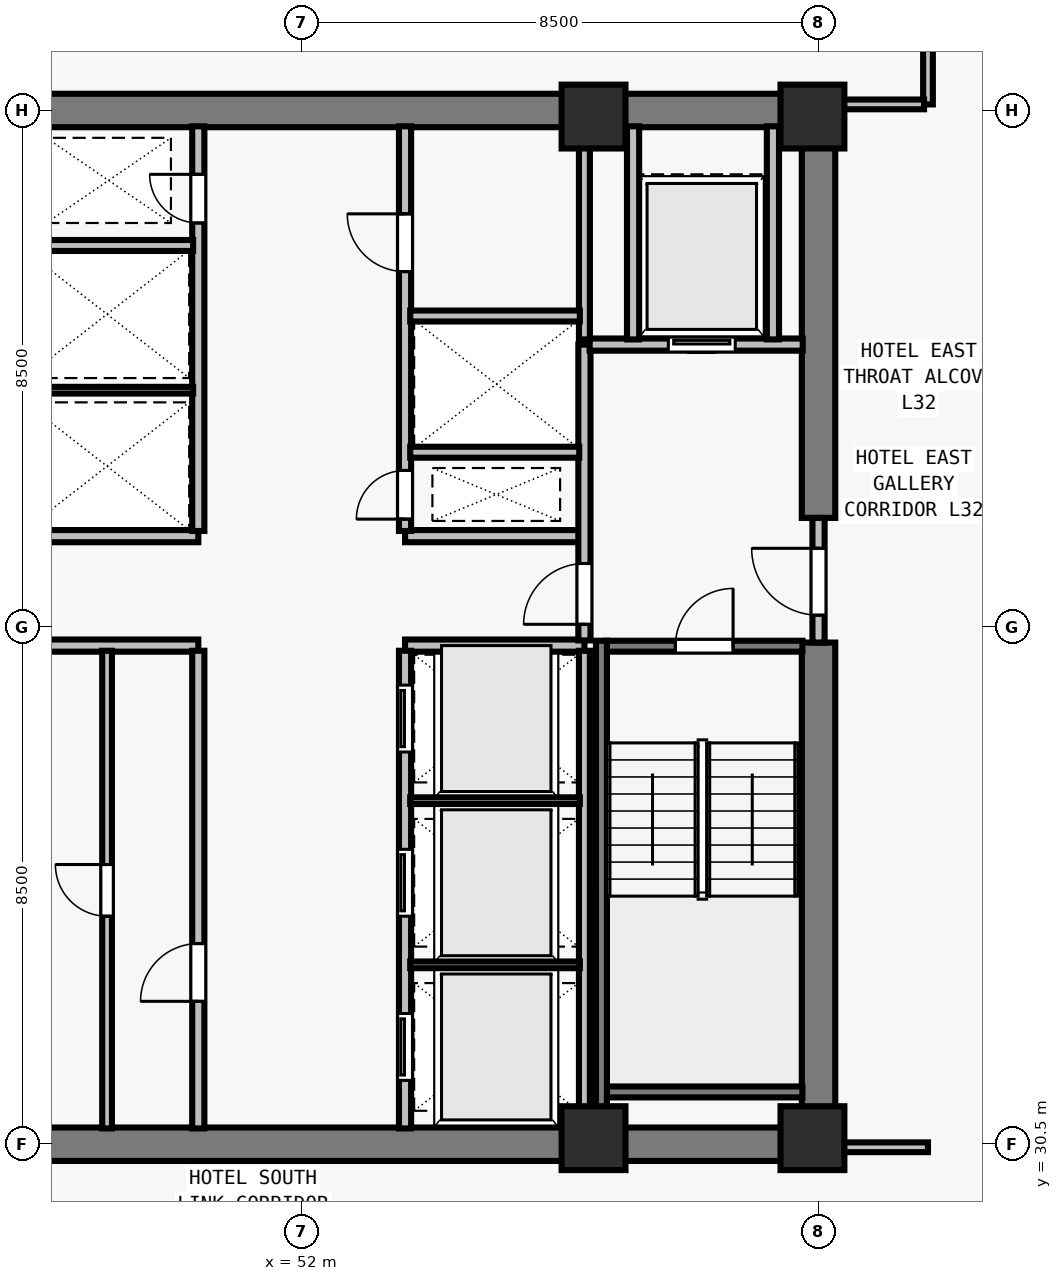
"""IFC4 building model, lengths in metres.
Left out: names, types, materials, properties, quantities, classifications, styles, units other than length and angle.
Written with IfcOpenShell. Run it as: python <this file> out.ifc"""

import sys

from ifc_helpers import new_model, si_unit, direction, frame, frame_2d, origin, origin_2d, place, context, subcontext, project, spatial, rectangle, extrude, element, fill, save


model = new_model("IFC4")
c1 = context("Model", 3, precision=1e-05, world=origin(), true_north=direction((0.0, 1.0)))
c2 = subcontext(c1, "Body", "Model", "MODEL_VIEW")
j1 = project(units=[si_unit("LENGTHUNIT", "METRE"), si_unit("PLANEANGLEUNIT", "RADIAN")], contexts=[c1])
p1 = place(None, origin())
s1 = spatial("IfcSite", under=j1, at=p1, CompositionType="ELEMENT")
p2 = place(p1, origin())
s2 = spatial("IfcBuilding", under=s1, at=p2, CompositionType="ELEMENT")
p3 = place(p2, frame((0.0, 0.0, 120.0)))
s3 = spatial("IfcBuildingStorey", under=s2, at=p3, CompositionType="ELEMENT", Elevation=120.0)
for number, where, z_axis, x_axis in (
    (1, (56.8, 30.6, 0.0), (0.0, 0.0, 1.0), (1.0, 0.0, 0.0)),
    (2, (60.4, 30.6, 0.0), (0.0, 0.0, 1.0), (1.0, 0.0, 0.0)),
    (3, (56.8, 47.4, 0.0), (0.0, 0.0, 1.0), (1.0, 0.0, 0.0)),
    (4, (60.4, 47.4, 0.0), (0.0, 0.0, 1.0), (1.0, 0.0, 0.0)),
):
    element("IfcColumn", number, at=place(p3, frame(where, z_axis=z_axis, x_axis=x_axis)), inside=s3, PredefinedType="COLUMN", context=c2, shape_type="SweptSolid", body=[
        extrude(rectangle(XDim=1.05, YDim=1.05, at=origin_2d()), origin(), (0.0, 0.0, 1.0), 3.5),
    ])
for number, where, z_axis, x_axis in (
    (5, (43.225, 30.5, 0.0), (0.0, 0.0, 1.0), (1.0, 0.0, 0.0)),
    (6, (43.225, 47.5, 0.0), (0.0, 0.0, 1.0), (1.0, 0.0, 0.0)),
):
    element("IfcWall", number, at=place(p3, frame(where, z_axis=z_axis, x_axis=x_axis)), inside=s3, PredefinedType="SHEAR", context=c2, shape_type="SweptSolid", body=[
        extrude(rectangle(XDim=17.55, YDim=0.55, at=frame_2d((8.775, 0.0))), origin(), (0.0, 0.0, 1.0), 3.28),
    ])
p4 = place(p3, frame((60.5, 30.765, 0.0), z_axis=(0.0, 0.0, 1.0), x_axis=(0.0, 1.0, 0.0)))
e7 = element("IfcWall", 7, at=p4, inside=s3, PredefinedType="SHEAR", context=c2, shape_type="SweptSolid", body=[
    extrude(rectangle(XDim=7.985, YDim=0.55, at=frame_2d((3.993, 0.0))), origin(), (0.0, 0.0, 1.0), 3.28),
])
p5 = place(p3, frame((60.5, 40.8, 0.0), z_axis=(0.0, 0.0, 1.0), x_axis=(0.0, 1.0, 0.0)))
e8 = element("IfcWall", 8, at=p5, inside=s3, PredefinedType="SHEAR", context=c2, shape_type="SweptSolid", body=[
    extrude(rectangle(XDim=6.435, YDim=0.55, at=frame_2d((3.218, 0.0))), origin(), (0.0, 0.0, 1.0), 3.28),
])
for number, where, z_axis, x_axis in (
    (9, (47.35, 38.7, 0.0), (0.0, 0.0, 1.0), (1.0, 0.0, 0.0)),
    (10, (47.35, 40.5, 0.0), (0.0, 0.0, 1.0), (1.0, 0.0, 0.0)),
    (11, (53.7, 38.7, 0.0), (0.0, 0.0, 1.0), (1.0, 0.0, 0.0)),
    (12, (53.7, 40.5, 0.0), (0.0, 0.0, 1.0), (1.0, 0.0, 0.0)),
):
    element("IfcWall", number, at=place(p3, frame(where, z_axis=z_axis, x_axis=x_axis)), inside=s3, PredefinedType="SOLIDWALL", context=c2, shape_type="SweptSolid", body=[
        extrude(rectangle(XDim=2.95, YDim=0.2, at=frame_2d((1.475, 0.0))), origin(), (0.0, 0.0, 1.0), 3.28),
    ])
p6 = place(p3, frame((50.3, 30.76, 0.0), z_axis=(0.0, 0.0, 1.0), x_axis=(0.0, 1.0, 0.0)))
e13 = element("IfcWall", 13, at=p6, inside=s3, PredefinedType="SOLIDWALL", context=c2, shape_type="SweptSolid", body=[
    extrude(rectangle(XDim=7.855, YDim=0.2, at=frame_2d((3.927, 0.0))), origin(), (0.0, 0.0, 1.0), 3.28),
])
p7 = place(p6, frame((2.09, 0.0, 0.0)))
e14 = element("IfcOpeningElement", 14, at=p7, cuts=e13, PredefinedType="OPENING", context=c2, shape_type="SweptSolid", body=[
    extrude(rectangle(XDim=0.95, YDim=2.12, at=frame_2d((0.475, 1.06))), frame((0.0, 0.11, 0.0), z_axis=(0.0, -1.0, 0.0), x_axis=(1.0, 0.0, 0.0)), (0.0, 0.0, 1.0), 0.22),
])
p8 = place(p3, frame((53.7, 30.76, 0.0), z_axis=(0.0, 0.0, 1.0), x_axis=(0.0, 1.0, 0.0)))
e15 = element("IfcWall", 15, at=p8, inside=s3, PredefinedType="SOLIDWALL", context=c2, shape_type="SweptSolid", body=[
    extrude(rectangle(XDim=7.855, YDim=0.2, at=frame_2d((3.927, 0.0))), origin(), (0.0, 0.0, 1.0), 3.28),
])
p9 = place(p8, frame((0.79, 0.0, 0.0)))
e16 = element("IfcOpeningElement", 16, at=p9, cuts=e15, PredefinedType="OPENING", context=c2, shape_type="SweptSolid", body=[
    extrude(rectangle(XDim=1.1, YDim=2.2, at=frame_2d((0.55, 1.1))), frame((0.0, 0.11, 0.0), z_axis=(0.0, -1.0, 0.0), x_axis=(1.0, 0.0, 0.0)), (0.0, 0.0, 1.0), 0.22),
])
p10 = place(p8, frame((3.49, 0.0, 0.0)))
e17 = element("IfcOpeningElement", 17, at=p10, cuts=e15, PredefinedType="OPENING", context=c2, shape_type="SweptSolid", body=[
    extrude(rectangle(XDim=1.1, YDim=2.2, at=frame_2d((0.55, 1.1))), frame((0.0, 0.11, 0.0), z_axis=(0.0, -1.0, 0.0), x_axis=(1.0, 0.0, 0.0)), (0.0, 0.0, 1.0), 0.22),
])
p11 = place(p8, frame((6.19, 0.0, 0.0)))
e18 = element("IfcOpeningElement", 18, at=p11, cuts=e15, PredefinedType="OPENING", context=c2, shape_type="SweptSolid", body=[
    extrude(rectangle(XDim=1.1, YDim=2.2, at=frame_2d((0.55, 1.1))), frame((0.0, 0.11, 0.0), z_axis=(0.0, -1.0, 0.0), x_axis=(1.0, 0.0, 0.0)), (0.0, 0.0, 1.0), 0.22),
])
p12 = place(p3, frame((50.3, 40.585, 0.0), z_axis=(0.0, 0.0, 1.0), x_axis=(0.0, 1.0, 0.0)))
e19 = element("IfcWall", 19, at=p12, inside=s3, PredefinedType="SOLIDWALL", context=c2, shape_type="SweptSolid", body=[
    extrude(rectangle(XDim=6.655, YDim=0.2, at=frame_2d((3.328, 0.0))), origin(), (0.0, 0.0, 1.0), 3.28),
])
p13 = place(p12, frame((5.065, 0.0, 0.0)))
e20 = element("IfcOpeningElement", 20, at=p13, cuts=e19, PredefinedType="OPENING", context=c2, shape_type="SweptSolid", body=[
    extrude(rectangle(XDim=0.8, YDim=2.08, at=frame_2d((0.4, 1.04))), frame((0.0, 0.11, 0.0), z_axis=(0.0, -1.0, 0.0), x_axis=(1.0, 0.0, 0.0)), (0.0, 0.0, 1.0), 0.22),
])
p14 = place(p3, frame((53.7, 40.585, 0.0), z_axis=(0.0, 0.0, 1.0), x_axis=(0.0, 1.0, 0.0)))
e21 = element("IfcWall", 21, at=p14, inside=s3, PredefinedType="SOLIDWALL", context=c2, shape_type="SweptSolid", body=[
    extrude(rectangle(XDim=6.655, YDim=0.2, at=frame_2d((3.328, 0.0))), origin(), (0.0, 0.0, 1.0), 3.28),
])
p15 = place(p14, frame((0.195, 0.0, 0.0)))
e22 = element("IfcOpeningElement", 22, at=p15, cuts=e21, PredefinedType="OPENING", context=c2, shape_type="SweptSolid", body=[
    extrude(rectangle(XDim=0.8, YDim=2.08, at=frame_2d((0.4, 1.04))), frame((0.0, 0.11, 0.0), z_axis=(0.0, -1.0, 0.0), x_axis=(1.0, 0.0, 0.0)), (0.0, 0.0, 1.0), 0.22),
])
p16 = place(p14, frame((4.265, 0.0, 0.0)))
e23 = element("IfcOpeningElement", 23, at=p16, cuts=e21, PredefinedType="OPENING", context=c2, shape_type="SweptSolid", body=[
    extrude(rectangle(XDim=0.95, YDim=2.12, at=frame_2d((0.475, 1.06))), frame((0.0, 0.11, 0.0), z_axis=(0.0, -1.0, 0.0), x_axis=(1.0, 0.0, 0.0)), (0.0, 0.0, 1.0), 0.22),
])
p17 = place(p3, frame((60.5, 38.75, 0.0), z_axis=(0.0, 0.0, 1.0), x_axis=(0.0, 1.0, 0.0)))
e24 = element("IfcWall", 24, at=p17, inside=s3, PredefinedType="SOLIDWALL", context=c2, shape_type="SweptSolid", body=[
    extrude(rectangle(XDim=2.05, YDim=0.2, at=frame_2d((1.025, 0.0))), origin(), (0.0, 0.0, 1.0), 3.28),
])
p18 = place(p17, frame((0.45, 0.0, 0.0)))
e25 = element("IfcOpeningElement", 25, at=p18, cuts=e24, PredefinedType="OPENING", context=c2, shape_type="SweptSolid", body=[
    extrude(rectangle(XDim=1.1, YDim=2.15, at=frame_2d((0.55, 1.075))), frame((0.0, 0.11, 0.0), z_axis=(0.0, -1.0, 0.0), x_axis=(1.0, 0.0, 0.0)), (0.0, 0.0, 1.0), 0.22),
])
p19 = place(p3, frame((56.65, 38.785, 0.0), z_axis=(0.0, 0.0, 1.0), x_axis=(0.0, 1.0, 0.0)))
e26 = element("IfcWall", 26, at=p19, inside=s3, PredefinedType="SOLIDWALL", context=c2, shape_type="SweptSolid", body=[
    extrude(rectangle(XDim=4.865, YDim=0.2, at=frame_2d((2.433, 0.0))), origin(), (0.0, 0.0, 1.0), 3.28),
])
p20 = place(p19, frame((0.265, 0.0, 0.0)))
e27 = element("IfcOpeningElement", 27, at=p20, cuts=e26, PredefinedType="OPENING", context=c2, shape_type="SweptSolid", body=[
    extrude(rectangle(XDim=1.0, YDim=2.15, at=frame_2d((0.5, 1.075))), frame((0.0, 0.11, 0.0), z_axis=(0.0, -1.0, 0.0), x_axis=(1.0, 0.0, 0.0)), (0.0, 0.0, 1.0), 0.22),
])
p21 = place(p3, frame((56.735, 43.65, 0.0), z_axis=(0.0, 0.0, 1.0), x_axis=(1.0, 0.0, 0.0)))
e28 = element("IfcWall", 28, at=p21, inside=s3, PredefinedType="SOLIDWALL", context=c2, shape_type="SweptSolid", body=[
    extrude(rectangle(XDim=3.505, YDim=0.2, at=frame_2d((1.752, 0.0))), origin(), (0.0, 0.0, 1.0), 3.28),
])
p22 = place(p21, frame((1.295, 0.0, 0.0)))
e29 = element("IfcOpeningElement", 29, at=p22, cuts=e28, PredefinedType="OPENING", context=c2, shape_type="SweptSolid", body=[
    extrude(rectangle(XDim=1.1, YDim=2.2, at=frame_2d((0.55, 1.1))), frame((0.0, 0.11, 0.0), z_axis=(0.0, -1.0, 0.0), x_axis=(1.0, 0.0, 0.0)), (0.0, 0.0, 1.0), 0.22),
])
for number, where, z_axis, x_axis in (
    (30, (57.45, 43.735, 0.0), (0.0, 0.0, 1.0), (0.0, 1.0, 0.0)),
    (31, (59.75, 43.735, 0.0), (0.0, 0.0, 1.0), (0.0, 1.0, 0.0)),
):
    element("IfcWall", number, at=place(p3, frame(where, z_axis=z_axis, x_axis=x_axis)), inside=s3, PredefinedType="SOLIDWALL", context=c2, shape_type="SweptSolid", body=[
        extrude(rectangle(XDim=3.505, YDim=0.2, at=frame_2d((1.752, 0.0))), origin(), (0.0, 0.0, 1.0), 3.28),
    ])
p23 = place(p3, frame((48.8, 30.76, 0.0), z_axis=(0.0, 0.0, 1.0), x_axis=(0.0, 1.0, 0.0)))
e32 = element("IfcWall", 32, at=p23, inside=s3, PredefinedType="PARTITIONING", context=c2, shape_type="SweptSolid", body=[
    extrude(rectangle(XDim=7.855, YDim=0.16, at=frame_2d((3.927, 0.0))), origin(), (0.0, 0.0, 1.0), 3.28),
])
p24 = place(p23, frame((3.49, 0.0, 0.0)))
e33 = element("IfcOpeningElement", 33, at=p24, cuts=e32, PredefinedType="OPENING", context=c2, shape_type="SweptSolid", body=[
    extrude(rectangle(XDim=0.85, YDim=2.12, at=frame_2d((0.425, 1.06))), frame((0.0, 0.09, 0.0), z_axis=(0.0, -1.0, 0.0), x_axis=(1.0, 0.0, 0.0)), (0.0, 0.0, 1.0), 0.18),
])
p25 = place(p3, frame((56.65, 30.76, 0.0), z_axis=(0.0, 0.0, 1.0), x_axis=(0.0, 1.0, 0.0)))
e34 = element("IfcWall", 34, at=p25, inside=s3, PredefinedType="SOLIDWALL", context=c2, shape_type="SweptSolid", body=[
    extrude(rectangle(XDim=7.855, YDim=0.18, at=frame_2d((3.927, 0.0))), origin(), (0.0, 0.0, 1.0), 3.28),
])
for number, where, z_axis, x_axis in (
    (35, (53.785, 33.45, 0.0), (0.0, 0.0, 1.0), (1.0, 0.0, 0.0)),
    (36, (53.785, 36.15, 0.0), (0.0, 0.0, 1.0), (1.0, 0.0, 0.0)),
):
    element("IfcWall", number, at=place(p3, frame(where, z_axis=z_axis, x_axis=x_axis)), inside=s3, PredefinedType="PARTITIONING", context=c2, shape_type="SweptSolid", body=[
        extrude(rectangle(XDim=2.79, YDim=0.11, at=frame_2d((1.395, 0.0))), origin(), (0.0, 0.0, 1.0), 3.28),
    ])
p26 = place(p3, frame((47.435, 42.9, 0.0), z_axis=(0.0, 0.0, 1.0), x_axis=(1.0, 0.0, 0.0)))
e37 = element("IfcWall", 37, at=p26, inside=s3, PredefinedType="PARTITIONING", context=c2, shape_type="SweptSolid", body=[
    extrude(rectangle(XDim=2.78, YDim=0.11, at=frame_2d((1.39, 0.0))), origin(), (0.0, 0.0, 1.0), 3.28),
])
p27 = place(p3, frame((47.425, 45.28, 0.0), z_axis=(0.0, 0.0, 1.0), x_axis=(1.0, 0.0, 0.0)))
e38 = element("IfcWall", 38, at=p27, inside=s3, PredefinedType="SOLIDWALL", context=c2, shape_type="SweptSolid", body=[
    extrude(rectangle(XDim=2.79, YDim=0.18, at=frame_2d((1.395, 0.0))), origin(), (0.0, 0.0, 1.0), 3.28),
])
p28 = place(p3, frame((56.65, 43.735, 0.0), z_axis=(0.0, 0.0, 1.0), x_axis=(0.0, 1.0, 0.0)))
e39 = element("IfcWall", 39, at=p28, inside=s3, PredefinedType="SOLIDWALL", context=c2, shape_type="SweptSolid", body=[
    extrude(rectangle(XDim=3.505, YDim=0.18, at=frame_2d((1.752, 0.0))), origin(), (0.0, 0.0, 1.0), 3.28),
])
p29 = place(p3, frame((53.785, 41.88, 0.0), z_axis=(0.0, 0.0, 1.0), x_axis=(1.0, 0.0, 0.0)))
e40 = element("IfcWall", 40, at=p29, inside=s3, PredefinedType="SOLIDWALL", context=c2, shape_type="SweptSolid", body=[
    extrude(rectangle(XDim=2.78, YDim=0.18, at=frame_2d((1.39, 0.0))), origin(), (0.0, 0.0, 1.0), 3.28),
])
p30 = place(p3, frame((53.785, 44.12, 0.0), z_axis=(0.0, 0.0, 1.0), x_axis=(1.0, 0.0, 0.0)))
e41 = element("IfcWall", 41, at=p30, inside=s3, PredefinedType="SOLIDWALL", context=c2, shape_type="SweptSolid", body=[
    extrude(rectangle(XDim=2.79, YDim=0.18, at=frame_2d((1.395, 0.0))), origin(), (0.0, 0.0, 1.0), 3.28),
])
p31 = place(p3, frame((62.3, 47.6, 0.0), z_axis=(0.0, 0.0, 1.0), x_axis=(0.0, 1.0, 0.0)))
e42 = element("IfcWall", 42, at=p31, inside=s3, PredefinedType="PARTITIONING", context=c2, shape_type="SweptSolid", body=[
    extrude(rectangle(XDim=15.075, YDim=0.16, at=frame_2d((7.538, 0.0))), origin(), (0.0, 0.0, 1.0), 2.555),
])
p32 = place(p3, frame((60.765, 30.45, 0.0), z_axis=(0.0, 0.0, 1.0), x_axis=(1.0, 0.0, 0.0)))
e43 = element("IfcWall", 43, at=p32, inside=s3, PredefinedType="PARTITIONING", context=c2, shape_type="SweptSolid", body=[
    extrude(rectangle(XDim=1.535, YDim=0.16, at=frame_2d((0.768, 0.0))), origin(), (0.0, 0.0, 1.0), 3.28),
])
p33 = place(p3, frame((60.765, 47.6, 0.0), z_axis=(0.0, 0.0, 1.0), x_axis=(1.0, 0.0, 0.0)))
e44 = element("IfcWall", 44, at=p33, inside=s3, PredefinedType="PARTITIONING", context=c2, shape_type="SweptSolid", body=[
    extrude(rectangle(XDim=1.47, YDim=0.16, at=frame_2d((0.735, 0.0))), origin(), (0.0, 0.0, 1.0), 3.28),
])
p34 = place(p3, frame((57.005, 38.69, 0.0), z_axis=(0.0, 0.0, 1.0), x_axis=(1.0, 0.0, 0.0)))
e45 = element("IfcWall", 45, at=p34, inside=s3, PredefinedType="SOLIDWALL", context=c2, shape_type="SweptSolid", body=[
    extrude(rectangle(XDim=3.23, YDim=0.18, at=frame_2d((1.615, 0.0))), origin(), (0.0, 0.0, 1.0), 3.28),
])
p35 = place(p34, frame((1.14, 0.0, 0.0)))
e46 = element("IfcOpeningElement", 46, at=p35, cuts=e45, PredefinedType="OPENING", context=c2, shape_type="SweptSolid", body=[
    extrude(rectangle(XDim=0.95, YDim=2.15, at=frame_2d((0.475, 1.075))), frame((0.0, 0.1, 0.0), z_axis=(0.0, -1.0, 0.0), x_axis=(1.0, 0.0, 0.0)), (0.0, 0.0, 1.0), 0.2),
])
p36 = place(p3, frame((57.005, 31.36, 0.0), z_axis=(0.0, 0.0, 1.0), x_axis=(1.0, 0.0, 0.0)))
e47 = element("IfcWall", 47, at=p36, inside=s3, PredefinedType="SOLIDWALL", context=c2, shape_type="SweptSolid", body=[
    extrude(rectangle(XDim=3.23, YDim=0.18, at=frame_2d((1.615, 0.0))), origin(), (0.0, 0.0, 1.0), 3.28),
])
p37 = place(p3, frame((56.93, 38.78, 0.0), z_axis=(0.0, 0.0, 1.0), x_axis=(0.0, -1.0, 0.0)))
e48 = element("IfcWall", 48, at=p37, inside=s3, PredefinedType="SOLIDWALL", context=c2, shape_type="SweptSolid", body=[
    extrude(rectangle(XDim=8.017, YDim=0.18, at=frame_2d((4.009, 0.0))), origin(), (0.0, 0.0, 1.0), 3.28),
])
p38 = place(p18, origin())
e49 = element("IfcDoor", 49, at=p38, inside=s3, OperationType="SINGLE_SWING_RIGHT", PredefinedType="DOOR", context=c2, shape_type="SweptSolid", body=[
    extrude(rectangle(XDim=1.1, YDim=2.15, at=frame_2d((0.55, 1.075))), frame((0.0, 0.025, 0.0), z_axis=(0.0, -1.0, 0.0), x_axis=(1.0, 0.0, 0.0)), (0.0, 0.0, 1.0), 0.05),
])
fill(e25, e49)
p39 = place(p20, origin())
e50 = element("IfcDoor", 50, at=p39, inside=s3, OperationType="SINGLE_SWING_LEFT", PredefinedType="DOOR", context=c2, shape_type="SweptSolid", body=[
    extrude(rectangle(XDim=1.0, YDim=2.15, at=frame_2d((0.5, 1.075))), frame((0.0, 0.025, 0.0), z_axis=(0.0, -1.0, 0.0), x_axis=(1.0, 0.0, 0.0)), (0.0, 0.0, 1.0), 0.05),
])
fill(e27, e50)
p40 = place(p22, origin())
e51 = element("IfcDoor", 51, at=p40, inside=s3, OperationType="SLIDING_TO_LEFT", PredefinedType="DOOR", context=c2, shape_type="SweptSolid", body=[
    extrude(rectangle(XDim=1.1, YDim=2.2, at=frame_2d((0.55, 1.1))), frame((0.0, 0.025, 0.0), z_axis=(0.0, -1.0, 0.0), x_axis=(1.0, 0.0, 0.0)), (0.0, 0.0, 1.0), 0.05),
])
fill(e29, e51)
p41 = place(p7, origin())
e52 = element("IfcDoor", 52, at=p41, inside=s3, OperationType="SINGLE_SWING_LEFT", PredefinedType="DOOR", context=c2, shape_type="SweptSolid", body=[
    extrude(rectangle(XDim=0.95, YDim=2.12, at=frame_2d((0.475, 1.06))), frame((0.0, 0.025, 0.0), z_axis=(0.0, -1.0, 0.0), x_axis=(1.0, 0.0, 0.0)), (0.0, 0.0, 1.0), 0.05),
])
fill(e14, e52)
p42 = place(p24, origin())
e53 = element("IfcDoor", 53, at=p42, inside=s3, OperationType="SINGLE_SWING_RIGHT", PredefinedType="DOOR", context=c2, shape_type="SweptSolid", body=[
    extrude(rectangle(XDim=0.85, YDim=2.12, at=frame_2d((0.425, 1.06))), frame((0.0, 0.025, 0.0), z_axis=(0.0, -1.0, 0.0), x_axis=(1.0, 0.0, 0.0)), (0.0, 0.0, 1.0), 0.05),
])
fill(e33, e53)
p43 = place(p9, origin())
e54 = element("IfcDoor", 54, at=p43, inside=s3, OperationType="SLIDING_TO_LEFT", PredefinedType="DOOR", context=c2, shape_type="SweptSolid", body=[
    extrude(rectangle(XDim=1.1, YDim=2.2, at=frame_2d((0.55, 1.1))), frame((0.0, 0.025, 0.0), z_axis=(0.0, -1.0, 0.0), x_axis=(1.0, 0.0, 0.0)), (0.0, 0.0, 1.0), 0.05),
])
fill(e16, e54)
p44 = place(p10, origin())
e55 = element("IfcDoor", 55, at=p44, inside=s3, OperationType="SLIDING_TO_LEFT", PredefinedType="DOOR", context=c2, shape_type="SweptSolid", body=[
    extrude(rectangle(XDim=1.1, YDim=2.2, at=frame_2d((0.55, 1.1))), frame((0.0, 0.025, 0.0), z_axis=(0.0, -1.0, 0.0), x_axis=(1.0, 0.0, 0.0)), (0.0, 0.0, 1.0), 0.05),
])
fill(e17, e55)
p45 = place(p11, origin())
e56 = element("IfcDoor", 56, at=p45, inside=s3, OperationType="SLIDING_TO_LEFT", PredefinedType="DOOR", context=c2, shape_type="SweptSolid", body=[
    extrude(rectangle(XDim=1.1, YDim=2.2, at=frame_2d((0.55, 1.1))), frame((0.0, 0.025, 0.0), z_axis=(0.0, -1.0, 0.0), x_axis=(1.0, 0.0, 0.0)), (0.0, 0.0, 1.0), 0.05),
])
fill(e18, e56)
p46 = place(p13, origin())
e57 = element("IfcDoor", 57, at=p46, inside=s3, OperationType="SINGLE_SWING_RIGHT", PredefinedType="DOOR", context=c2, shape_type="SweptSolid", body=[
    extrude(rectangle(XDim=0.8, YDim=2.08, at=frame_2d((0.4, 1.04))), frame((0.0, 0.025, 0.0), z_axis=(0.0, -1.0, 0.0), x_axis=(1.0, 0.0, 0.0)), (0.0, 0.0, 1.0), 0.05),
])
fill(e20, e57)
p47 = place(p15, origin())
e58 = element("IfcDoor", 58, at=p47, inside=s3, OperationType="SINGLE_SWING_LEFT", PredefinedType="DOOR", context=c2, shape_type="SweptSolid", body=[
    extrude(rectangle(XDim=0.8, YDim=2.08, at=frame_2d((0.4, 1.04))), frame((0.0, 0.025, 0.0), z_axis=(0.0, -1.0, 0.0), x_axis=(1.0, 0.0, 0.0)), (0.0, 0.0, 1.0), 0.05),
])
fill(e22, e58)
p48 = place(p16, origin())
e59 = element("IfcDoor", 59, at=p48, inside=s3, OperationType="SINGLE_SWING_RIGHT", PredefinedType="DOOR", context=c2, shape_type="SweptSolid", body=[
    extrude(rectangle(XDim=0.95, YDim=2.12, at=frame_2d((0.475, 1.06))), frame((0.0, 0.025, 0.0), z_axis=(0.0, -1.0, 0.0), x_axis=(1.0, 0.0, 0.0)), (0.0, 0.0, 1.0), 0.05),
])
fill(e23, e59)
p49 = place(p35, origin())
e60 = element("IfcDoor", 60, at=p49, inside=s3, OperationType="SINGLE_SWING_RIGHT", PredefinedType="DOOR", context=c2, shape_type="SweptSolid", body=[
    extrude(rectangle(XDim=0.95, YDim=2.15, at=frame_2d((0.475, 1.075))), frame((0.0, 0.025, 0.0), z_axis=(0.0, -1.0, 0.0), x_axis=(1.0, 0.0, 0.0)), (0.0, 0.0, 1.0), 0.05),
])
fill(e46, e60)
save(model, sys.argv[1])
